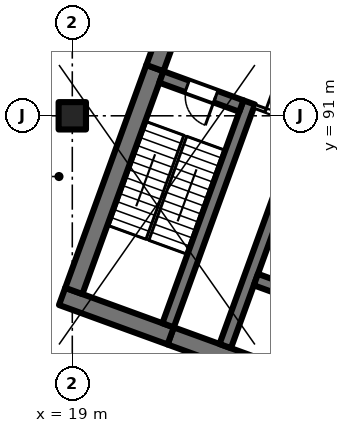
"""IFC4 building model, lengths in metres.
Left out: names, types, materials, properties, quantities, classifications, styles, units other than length and angle.
Written with IfcOpenShell. Run it as: python <this file> out.ifc"""

import sys

from ifc_helpers import new_model, si_unit, direction, frame, frame_2d, origin, origin_2d, place, context, subcontext, project, spatial, rectangle, extrude, element, fill, save


model = new_model("IFC4")
c1 = context("Model", 3, precision=1e-05, world=origin(), true_north=direction((0.0, 1.0)))
c2 = subcontext(c1, "Body", "Model", "MODEL_VIEW")
j1 = project(units=[si_unit("LENGTHUNIT", "METRE"), si_unit("PLANEANGLEUNIT", "RADIAN")], contexts=[c1])
p1 = place(None, origin())
s1 = spatial("IfcSite", under=j1, at=p1, CompositionType="ELEMENT")
p2 = place(p1, origin())
s2 = spatial("IfcBuilding", under=s1, at=p2, CompositionType="ELEMENT")
p3 = place(p2, frame((0.0, 0.0, 7.5)))
s3 = spatial("IfcBuildingStorey", under=s2, at=p3, CompositionType="ELEMENT", Elevation=7.5)
p4 = place(p3, frame((19.0, 91.0, 0.0), z_axis=(0.0, 0.0, 1.0), x_axis=(1.0, 0.0, 0.0)))
e1 = element("IfcColumn", 1, at=p4, inside=s3, PredefinedType="COLUMN", context=c2, shape_type="SweptSolid", body=[
    extrude(rectangle(XDim=0.9, YDim=0.9, at=origin_2d()), origin(), (0.0, 0.0, 1.0), 5.0),
])
p5 = place(p3, frame((35.767, 78.835, 0.0), z_axis=(0.0, 0.0, 1.0), x_axis=(-0.939692894512, 0.342019391267, 0.0)))
e2 = element("IfcWall", 2, at=p5, inside=s3, PredefinedType="SHEAR", context=c2, shape_type="SweptSolid", body=[
    extrude(rectangle(XDim=14.4, YDim=0.6, at=frame_2d((7.2, 0.0))), origin(), (0.0, 0.0, 1.0), 5.0),
])
p6 = place(p3, frame((22.236, 83.76, 0.0), z_axis=(0.0, 0.0, 1.0), x_axis=(-0.939680822529, 0.342052557032, 0.0)))
e3 = element("IfcWall", 3, at=p6, inside=s3, PredefinedType="SHEAR", context=c2, shape_type="SweptSolid", body=[
    extrude(rectangle(XDim=3.8, YDim=0.6, at=frame_2d((1.9, 0.0))), origin(), (0.0, 0.0, 1.0), 5.0),
])
p7 = place(p3, frame((19.05, 85.239, 0.0), z_axis=(0.0, 0.0, 1.0), x_axis=(0.342016982193, 0.939693771338, 0.0)))
e4 = element("IfcWall", 4, at=p7, inside=s3, PredefinedType="SHEAR", context=c2, shape_type="SweptSolid", body=[
    extrude(rectangle(XDim=7.8, YDim=0.6, at=frame_2d((3.9, 0.0))), origin(), (0.0, 0.0, 1.0), 5.0),
])
p8 = place(p3, frame((21.717, 92.568, 0.0), z_axis=(0.0, 0.0, 1.0), x_axis=(0.342016162452, 0.939694069696, 0.0)))
e5 = element("IfcWall", 5, at=p8, inside=s3, PredefinedType="SHEAR", context=c2, shape_type="SweptSolid", body=[
    extrude(rectangle(XDim=8.9, YDim=0.6, at=frame_2d((4.45, 0.0))), origin(), (0.0, 0.0, 1.0), 5.0),
])
p9 = place(p3, frame((22.15, 84.11, 0.0), z_axis=(0.0, 0.0, 1.0), x_axis=(0.342016982193, 0.939693771338, 0.0)))
e6 = element("IfcWall", 6, at=p9, inside=s3, PredefinedType="SHEAR", context=c2, shape_type="SweptSolid", body=[
    extrude(rectangle(XDim=7.8, YDim=0.4, at=frame_2d((3.9, 0.0))), origin(), (0.0, 0.0, 1.0), 5.0),
])
p10 = place(p3, frame((24.562, 91.32, 0.0), z_axis=(0.0, 0.0, 1.0), x_axis=(-0.939717030584, 0.341953070509, 0.0)))
e7 = element("IfcWall", 7, at=p10, inside=s3, PredefinedType="SHEAR", context=c2, shape_type="SweptSolid", body=[
    extrude(rectangle(XDim=2.8, YDim=0.4, at=frame_2d((1.4, 0.0))), origin(), (0.0, 0.0, 1.0), 5.0),
])
p11 = place(p10, frame((0.9, 0.0, 0.0)))
e8 = element("IfcOpeningElement", 8, at=p11, cuts=e7, PredefinedType="OPENING", context=c2, shape_type="SweptSolid", body=[
    extrude(rectangle(XDim=1.0, YDim=2.1, at=frame_2d((0.5, 1.05))), frame((0.0, 0.21, 0.0), z_axis=(0.0, -1.0, 0.0), x_axis=(1.0, 0.0, 0.0)), (0.0, 0.0, 1.0), 0.42),
])
p12 = place(p3, frame((24.03, 83.426, 0.0), z_axis=(0.0, 0.0, 1.0), x_axis=(0.342014590177, 0.939694641948, 0.0)))
e9 = element("IfcWall", 9, at=p12, inside=s3, PredefinedType="SHEAR", context=c2, shape_type="SweptSolid", body=[
    extrude(rectangle(XDim=12.2, YDim=0.4, at=frame_2d((6.1, 0.0))), origin(), (0.0, 0.0, 1.0), 5.0),
])
p13 = place(p12, frame((7.9, 0.0, 0.0)))
e10 = element("IfcOpeningElement", 10, at=p13, cuts=e9, PredefinedType="OPENING", context=c2, shape_type="SweptSolid", body=[
    extrude(rectangle(XDim=1.1, YDim=2.1, at=frame_2d((0.55, 1.05))), frame((0.0, 0.21, 0.0), z_axis=(0.0, -1.0, 0.0), x_axis=(1.0, 0.0, 0.0)), (0.0, 0.0, 1.0), 0.42),
])
p14 = place(p3, frame((27.858, 84.587, 0.0), z_axis=(0.0, 0.0, 1.0), x_axis=(-0.939686455819, 0.342037080957, 0.0)))
e11 = element("IfcWall", 11, at=p14, inside=s3, PredefinedType="SHEAR", context=c2, shape_type="SweptSolid", body=[
    extrude(rectangle(XDim=3.0, YDim=0.4, at=frame_2d((1.5, 0.0))), origin(), (0.0, 0.0, 1.0), 5.0),
])
p15 = place(p3, frame((12.199, 89.809, 0.0), z_axis=(0.0, 0.0, 1.0), x_axis=(0.342022998908, 0.939691581434, 0.0)))
e12 = element("IfcWall", 12, at=p15, inside=s3, PredefinedType="SOLIDWALL", context=c2, shape_type="SweptSolid", body=[
    extrude(rectangle(XDim=47.334, YDim=0.6, at=frame_2d((23.667, 0.0))), origin(), (0.0, 0.0, 1.0), 4.6),
])
p16 = place(p15, frame((0.773, 0.0, 0.9)))
e13 = element("IfcOpeningElement", 13, at=p16, cuts=e12, PredefinedType="OPENING", context=c2, shape_type="SweptSolid", body=[
    extrude(rectangle(XDim=3.0, YDim=3.0, at=frame_2d((1.5, 1.5))), frame((0.0, 0.31, 0.0), z_axis=(0.0, -1.0, 0.0), x_axis=(1.0, 0.0, 0.0)), (0.0, 0.0, 1.0), 0.62),
])
p17 = place(p15, frame((5.379, 0.0, 0.9)))
e14 = element("IfcOpeningElement", 14, at=p17, cuts=e12, PredefinedType="OPENING", context=c2, shape_type="SweptSolid", body=[
    extrude(rectangle(XDim=3.0, YDim=3.0, at=frame_2d((1.5, 1.5))), frame((0.0, 0.31, 0.0), z_axis=(0.0, -1.0, 0.0), x_axis=(1.0, 0.0, 0.0)), (0.0, 0.0, 1.0), 0.62),
])
p18 = place(p15, frame((9.235, 0.0, 0.9)))
e15 = element("IfcOpeningElement", 15, at=p18, cuts=e12, PredefinedType="OPENING", context=c2, shape_type="SweptSolid", body=[
    extrude(rectangle(XDim=3.0, YDim=3.0, at=frame_2d((1.5, 1.5))), frame((0.0, 0.31, 0.0), z_axis=(0.0, -1.0, 0.0), x_axis=(1.0, 0.0, 0.0)), (0.0, 0.0, 1.0), 0.62),
])
p19 = place(p15, frame((14.786, 0.0, 0.9)))
e16 = element("IfcOpeningElement", 16, at=p19, cuts=e12, PredefinedType="OPENING", context=c2, shape_type="SweptSolid", body=[
    extrude(rectangle(XDim=1.2, YDim=3.0, at=frame_2d((0.6, 1.5))), frame((0.0, 0.31, 0.0), z_axis=(0.0, -1.0, 0.0), x_axis=(1.0, 0.0, 0.0)), (0.0, 0.0, 1.0), 0.62),
])
p20 = place(p15, frame((16.286, 0.0, 0.9)))
e17 = element("IfcOpeningElement", 17, at=p20, cuts=e12, PredefinedType="OPENING", context=c2, shape_type="SweptSolid", body=[
    extrude(rectangle(XDim=1.2, YDim=3.0, at=frame_2d((0.6, 1.5))), frame((0.0, 0.31, 0.0), z_axis=(0.0, -1.0, 0.0), x_axis=(1.0, 0.0, 0.0)), (0.0, 0.0, 1.0), 0.62),
])
p21 = place(p15, frame((18.118, 0.0, 0.9)))
e18 = element("IfcOpeningElement", 18, at=p21, cuts=e12, PredefinedType="OPENING", context=c2, shape_type="SweptSolid", body=[
    extrude(rectangle(XDim=1.2, YDim=3.0, at=frame_2d((0.6, 1.5))), frame((0.0, 0.31, 0.0), z_axis=(0.0, -1.0, 0.0), x_axis=(1.0, 0.0, 0.0)), (0.0, 0.0, 1.0), 0.62),
])
p22 = place(p15, frame((19.618, 0.0, 0.9)))
e19 = element("IfcOpeningElement", 19, at=p22, cuts=e12, PredefinedType="OPENING", context=c2, shape_type="SweptSolid", body=[
    extrude(rectangle(XDim=1.2, YDim=3.0, at=frame_2d((0.6, 1.5))), frame((0.0, 0.31, 0.0), z_axis=(0.0, -1.0, 0.0), x_axis=(1.0, 0.0, 0.0)), (0.0, 0.0, 1.0), 0.62),
])
p23 = place(p15, frame((22.452, 0.0, 0.9)))
e20 = element("IfcOpeningElement", 20, at=p23, cuts=e12, PredefinedType="OPENING", context=c2, shape_type="SweptSolid", body=[
    extrude(rectangle(XDim=3.0, YDim=3.0, at=frame_2d((1.5, 1.5))), frame((0.0, 0.31, 0.0), z_axis=(0.0, -1.0, 0.0), x_axis=(1.0, 0.0, 0.0)), (0.0, 0.0, 1.0), 0.62),
])
p24 = place(p15, frame((26.458, 0.0, 0.9)))
e21 = element("IfcOpeningElement", 21, at=p24, cuts=e12, PredefinedType="OPENING", context=c2, shape_type="SweptSolid", body=[
    extrude(rectangle(XDim=3.0, YDim=3.0, at=frame_2d((1.5, 1.5))), frame((0.0, 0.31, 0.0), z_axis=(0.0, -1.0, 0.0), x_axis=(1.0, 0.0, 0.0)), (0.0, 0.0, 1.0), 0.62),
])
p25 = place(p15, frame((31.064, 0.0, 0.9)))
e22 = element("IfcOpeningElement", 22, at=p25, cuts=e12, PredefinedType="OPENING", context=c2, shape_type="SweptSolid", body=[
    extrude(rectangle(XDim=3.0, YDim=3.0, at=frame_2d((1.5, 1.5))), frame((0.0, 0.31, 0.0), z_axis=(0.0, -1.0, 0.0), x_axis=(1.0, 0.0, 0.0)), (0.0, 0.0, 1.0), 0.62),
])
p26 = place(p15, frame((36.029, 0.0, 0.9)))
e23 = element("IfcOpeningElement", 23, at=p26, cuts=e12, PredefinedType="OPENING", context=c2, shape_type="SweptSolid", body=[
    extrude(rectangle(XDim=1.2, YDim=3.0, at=frame_2d((0.6, 1.5))), frame((0.0, 0.31, 0.0), z_axis=(0.0, -1.0, 0.0), x_axis=(1.0, 0.0, 0.0)), (0.0, 0.0, 1.0), 0.62),
])
p27 = place(p15, frame((39.676, 0.0, 0.9)))
e24 = element("IfcOpeningElement", 24, at=p27, cuts=e12, PredefinedType="OPENING", context=c2, shape_type="SweptSolid", body=[
    extrude(rectangle(XDim=3.0, YDim=3.0, at=frame_2d((1.5, 1.5))), frame((0.0, 0.31, 0.0), z_axis=(0.0, -1.0, 0.0), x_axis=(1.0, 0.0, 0.0)), (0.0, 0.0, 1.0), 0.62),
])
p28 = place(p15, frame((43.531, 0.0, 0.9)))
e25 = element("IfcOpeningElement", 25, at=p28, cuts=e12, PredefinedType="OPENING", context=c2, shape_type="SweptSolid", body=[
    extrude(rectangle(XDim=3.0, YDim=3.0, at=frame_2d((1.5, 1.5))), frame((0.0, 0.31, 0.0), z_axis=(0.0, -1.0, 0.0), x_axis=(1.0, 0.0, 0.0)), (0.0, 0.0, 1.0), 0.62),
])
p29 = place(p3, frame((24.985, 91.312, 0.0), z_axis=(0.0, 0.0, 1.0), x_axis=(0.939708740826, -0.341975850632, 0.0)))
e26 = element("IfcWall", 26, at=p29, inside=s3, PredefinedType="PARTITIONING", context=c2, shape_type="SweptSolid", body=[
    extrude(rectangle(XDim=1.6, YDim=0.125, at=frame_2d((0.8, 0.0))), origin(), (0.0, 0.0, 1.0), 4.6),
])
p30 = place(p29, frame((0.4, 0.0, 0.0)))
e27 = element("IfcOpeningElement", 27, at=p30, cuts=e26, PredefinedType="OPENING", context=c2, shape_type="SweptSolid", body=[
    extrude(rectangle(XDim=0.8, YDim=2.1, at=frame_2d((0.4, 1.05))), frame((0.0, 0.073, 0.0), z_axis=(0.0, -1.0, 0.0), x_axis=(1.0, 0.0, 0.0)), (0.0, 0.0, 1.0), 0.145),
])
p31 = place(p3, frame((15.169, 90.075, 0.0), z_axis=(0.0, 0.0, 1.0), x_axis=(0.342068648332, 0.93967496499, 0.0)))
e28 = element("IfcWall", 28, at=p31, inside=s3, PredefinedType="PARTITIONING", context=c2, shape_type="SweptSolid", body=[
    extrude(rectangle(XDim=13.185, YDim=0.15, at=frame_2d((6.592, 0.0))), origin(), (0.0, 0.0, 1.0), 4.6),
])
p32 = place(p31, frame((3.604, 0.0, 0.0)))
e29 = element("IfcOpeningElement", 29, at=p32, cuts=e28, PredefinedType="OPENING", context=c2, shape_type="SweptSolid", body=[
    extrude(rectangle(XDim=1.0, YDim=2.1, at=frame_2d((0.5, 1.05))), frame((0.0, 0.085, 0.0), z_axis=(0.0, -1.0, 0.0), x_axis=(1.0, 0.0, 0.0)), (0.0, 0.0, 1.0), 0.17),
])
p33 = place(p31, frame((11.227, 0.0, 0.0)))
e30 = element("IfcOpeningElement", 30, at=p33, cuts=e28, PredefinedType="OPENING", context=c2, shape_type="SweptSolid", body=[
    extrude(rectangle(XDim=1.0, YDim=2.1, at=frame_2d((0.5, 1.05))), frame((0.0, 0.085, 0.0), z_axis=(0.0, -1.0, 0.0), x_axis=(1.0, 0.0, 0.0)), (0.0, 0.0, 1.0), 0.17),
])
p34 = place(p11, origin())
e31 = element("IfcDoor", 31, at=p34, inside=s3, OperationType="SINGLE_SWING_LEFT", PredefinedType="DOOR", context=c2, shape_type="SweptSolid", body=[
    extrude(rectangle(XDim=1.0, YDim=2.1, at=frame_2d((0.5, 1.05))), frame((0.0, 0.025, 0.0), z_axis=(0.0, -1.0, 0.0), x_axis=(1.0, 0.0, 0.0)), (0.0, 0.0, 1.0), 0.05),
])
fill(e8, e31)
p35 = place(p30, origin())
e32 = element("IfcDoor", 32, at=p35, inside=s3, OperationType="SINGLE_SWING_RIGHT", PredefinedType="DOOR", context=c2, shape_type="SweptSolid", body=[
    extrude(rectangle(XDim=0.8, YDim=2.1, at=frame_2d((0.4, 1.05))), frame((0.0, 0.025, 0.0), z_axis=(0.0, -1.0, 0.0), x_axis=(1.0, 0.0, 0.0)), (0.0, 0.0, 1.0), 0.05),
])
fill(e27, e32)
save(model, sys.argv[1])
